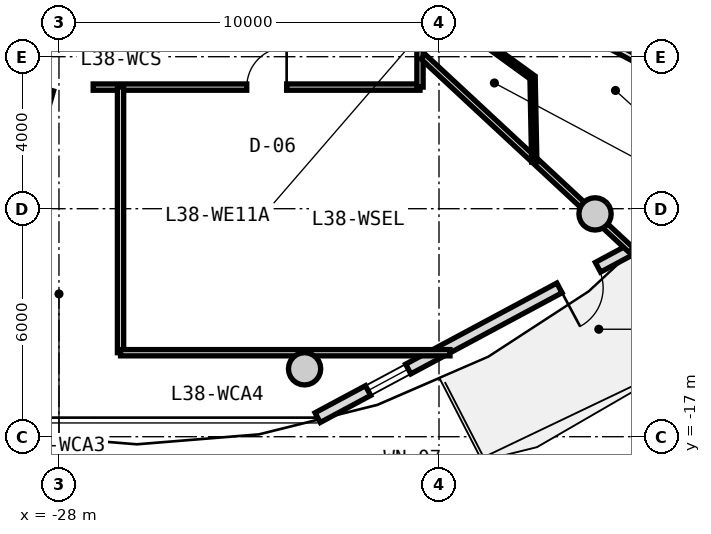
"""IFC4 building model, lengths in metres.
Left out: names, types, materials, properties, quantities, classifications, styles, units other than length and angle.
Written with IfcOpenShell. Run it as: python <this file> out.ifc"""

import sys

from ifc_helpers import new_model, si_unit, direction, frame, frame_2d, origin, origin_2d, place, context, subcontext, project, spatial, rectangle, circle, extrude, source, transform, mapped, element, fill, save


model = new_model("IFC4")
c1 = context("Model", 3, precision=1e-05, world=origin(), true_north=direction((0.0, 1.0)))
c2 = subcontext(c1, "Body", "Model", "MODEL_VIEW")
j1 = project(units=[si_unit("LENGTHUNIT", "METRE"), si_unit("PLANEANGLEUNIT", "RADIAN")], contexts=[c1])
p1 = place(None, origin())
s1 = spatial("IfcSite", under=j1, at=p1, CompositionType="ELEMENT")
p2 = place(p1, origin())
s2 = spatial("IfcBuilding", under=s1, at=p2, CompositionType="ELEMENT")
p3 = place(p2, frame((0.0, 0.0, 123.7)))
s3 = spatial("IfcBuildingStorey", under=s2, at=p3, CompositionType="ELEMENT", Elevation=123.7)
m1 = source(origin(), c2, "Body", "SweptSolid", [
    extrude(circle(Radius=0.425, at=origin_2d()), origin(), (0.0, 0.0, 1.0), 3.05),
])
for number, where, z_axis, x_axis in (
    (1, (-21.537, -15.213, 0.0), (0.0, 0.0, 1.0), (1.0, 0.0, 0.0)),
    (2, (-13.894, -11.137, 0.0), (0.0, 0.0, 1.0), (1.0, 0.0, 0.0)),
):
    element("IfcColumn", number, at=place(p3, frame(where, z_axis=z_axis, x_axis=x_axis)), inside=s3, PredefinedType="COLUMN", context=c2, shape_type="MappedRepresentation", body=[
        mapped(m1, transform((0.0, 0.0, 0.0), x_axis=(1.0, 0.0, 0.0), y_axis=(0.0, 1.0, 0.0), z_axis=(0.0, 0.0, 1.0), scale=1.0)),
    ])
m2 = source(origin(), c2, "Body", "SweptSolid", [
    extrude(rectangle(XDim=9.351, YDim=0.29, at=frame_2d((4.675, 0.0))), origin(), (0.0, 0.0, 1.0), 2.79),
])
p4 = place(p3, frame((-12.953, -12.077, 0.0), z_axis=(0.0, 0.0, 1.0), x_axis=(-0.881184411073, -0.472772708267, 0.0)))
e3 = element("IfcWall", 3, at=p4, inside=s3, PredefinedType="SOLIDWALL", context=c2, shape_type="MappedRepresentation", body=[
    mapped(m2, transform((0.0, 0.0, 0.0), x_axis=(1.0, 0.0, 0.0), y_axis=(0.0, 1.0, 0.0), z_axis=(0.0, 0.0, 1.0), scale=1.0)),
])
p5 = place(p4, frame((0.98, 0.0, 0.0)))
e4 = element("IfcOpeningElement", 4, at=p5, cuts=e3, PredefinedType="OPENING", context=c2, shape_type="SweptSolid", body=[
    extrude(rectangle(XDim=1.15, YDim=2.25, at=frame_2d((0.575, 1.125))), frame((0.0, 0.155, 0.0), z_axis=(0.0, -1.0, 0.0), x_axis=(1.0, 0.0, 0.0)), (0.0, 0.0, 1.0), 0.31),
])
p6 = place(p4, frame((6.645, 0.0, 0.85)))
e5 = element("IfcOpeningElement", 5, at=p6, cuts=e3, PredefinedType="OPENING", context=c2, shape_type="SweptSolid", body=[
    extrude(rectangle(XDim=1.2, YDim=1.5, at=frame_2d((0.6, 0.75))), frame((0.0, 0.155, 0.0), z_axis=(0.0, -1.0, 0.0), x_axis=(1.0, 0.0, 0.0)), (0.0, 0.0, 1.0), 0.31),
])
m3 = source(origin(), c2, "Body", "SweptSolid", [
    extrude(rectangle(XDim=8.6, YDim=0.165, at=frame_2d((4.3, 0.0))), origin(), (0.0, 0.0, 1.0), 2.775),
])
p7 = place(p3, frame((-18.5, -7.8, 0.0), z_axis=(0.0, 0.0, 1.0), x_axis=(-1.0, 0.0, 0.0)))
e6 = element("IfcWall", 6, at=p7, inside=s3, PredefinedType="PARTITIONING", context=c2, shape_type="MappedRepresentation", body=[
    mapped(m3, transform((0.0, 0.0, 0.0), x_axis=(1.0, 0.0, 0.0), y_axis=(0.0, 1.0, 0.0), z_axis=(0.0, 0.0, 1.0), scale=1.0)),
])
p8 = place(p7, frame((3.509, 0.0, 0.0)))
e7 = element("IfcOpeningElement", 7, at=p8, cuts=e6, PredefinedType="OPENING", context=c2, shape_type="SweptSolid", body=[
    extrude(rectangle(XDim=1.05, YDim=2.15, at=frame_2d((0.525, 1.075))), frame((0.0, 0.093, 0.0), z_axis=(0.0, -1.0, 0.0), x_axis=(1.0, 0.0, 0.0)), (0.0, 0.0, 1.0), 0.185),
])
m4 = source(origin(), c2, "Body", "SweptSolid", [
    extrude(rectangle(XDim=15.6, YDim=0.165, at=frame_2d((7.8, 0.0))), origin(), (0.0, 0.0, 1.0), 2.775),
])
p9 = place(p3, frame((-18.5, 7.8, 0.0), z_axis=(0.0, 0.0, 1.0), x_axis=(0.0, -1.0, 0.0)))
e8 = element("IfcWall", 8, at=p9, inside=s3, PredefinedType="PARTITIONING", context=c2, shape_type="MappedRepresentation", body=[
    mapped(m4, transform((0.0, 0.0, 0.0), x_axis=(1.0, 0.0, 0.0), y_axis=(0.0, 1.0, 0.0), z_axis=(0.0, 0.0, 1.0), scale=1.0)),
])
p10 = place(p9, frame((12.002, 0.0, 0.0)))
e9 = element("IfcOpeningElement", 9, at=p10, cuts=e8, PredefinedType="OPENING", context=c2, shape_type="SweptSolid", body=[
    extrude(rectangle(XDim=1.05, YDim=2.15, at=frame_2d((0.525, 1.075))), frame((0.0, 0.093, 0.0), z_axis=(0.0, -1.0, 0.0), x_axis=(1.0, 0.0, 0.0)), (0.0, 0.0, 1.0), 0.185),
])
p11 = place(p9, frame((10.211, 0.0, 0.0)))
e10 = element("IfcOpeningElement", 10, at=p11, cuts=e8, PredefinedType="OPENING", context=c2, shape_type="SweptSolid", body=[
    extrude(rectangle(XDim=1.05, YDim=2.15, at=frame_2d((0.525, 1.075))), frame((0.0, 0.093, 0.0), z_axis=(0.0, -1.0, 0.0), x_axis=(1.0, 0.0, 0.0)), (0.0, 0.0, 1.0), 0.185),
])
p12 = place(p9, frame((7.722, 0.0, 0.0)))
e11 = element("IfcOpeningElement", 11, at=p12, cuts=e8, PredefinedType="OPENING", context=c2, shape_type="SweptSolid", body=[
    extrude(rectangle(XDim=1.05, YDim=2.15, at=frame_2d((0.525, 1.075))), frame((0.0, 0.093, 0.0), z_axis=(0.0, -1.0, 0.0), x_axis=(1.0, 0.0, 0.0)), (0.0, 0.0, 1.0), 0.185),
])
p13 = place(p9, frame((6.291, 0.0, 0.0)))
e12 = element("IfcOpeningElement", 12, at=p13, cuts=e8, PredefinedType="OPENING", context=c2, shape_type="SweptSolid", body=[
    extrude(rectangle(XDim=1.05, YDim=2.15, at=frame_2d((0.525, 1.075))), frame((0.0, 0.093, 0.0), z_axis=(0.0, -1.0, 0.0), x_axis=(1.0, 0.0, 0.0)), (0.0, 0.0, 1.0), 0.185),
])
p14 = place(p9, frame((4.296, 0.0, 0.0)))
e13 = element("IfcOpeningElement", 13, at=p14, cuts=e8, PredefinedType="OPENING", context=c2, shape_type="SweptSolid", body=[
    extrude(rectangle(XDim=1.05, YDim=2.15, at=frame_2d((0.525, 1.075))), frame((0.0, 0.093, 0.0), z_axis=(0.0, -1.0, 0.0), x_axis=(1.0, 0.0, 0.0)), (0.0, 0.0, 1.0), 0.185),
])
p15 = place(p9, frame((1.654, 0.0, 0.0)))
e14 = element("IfcOpeningElement", 14, at=p15, cuts=e8, PredefinedType="OPENING", context=c2, shape_type="SweptSolid", body=[
    extrude(rectangle(XDim=1.05, YDim=2.15, at=frame_2d((0.525, 1.075))), frame((0.0, 0.093, 0.0), z_axis=(0.0, -1.0, 0.0), x_axis=(1.0, 0.0, 0.0)), (0.0, 0.0, 1.0), 0.185),
])
m5 = source(origin(), c2, "Body", "SweptSolid", [
    extrude(rectangle(XDim=8.989, YDim=0.165, at=frame_2d((4.495, 0.0))), origin(), (0.0, 0.0, 1.0), 2.275),
])
p16 = place(p3, frame((-28.222, -7.88, 0.0), z_axis=(0.0, 0.0, 1.0), x_axis=(-0.27702323008, -0.960863221274, 0.0)))
e15 = element("IfcWall", 15, at=p16, inside=s3, PredefinedType="PARTITIONING", context=c2, shape_type="MappedRepresentation", body=[
    mapped(m5, transform((0.0, 0.0, 0.0), x_axis=(1.0, 0.0, 0.0), y_axis=(0.0, 1.0, 0.0), z_axis=(0.0, 0.0, 1.0), scale=1.0)),
])
m6 = source(origin(), c2, "Body", "SweptSolid", [
    extrude(rectangle(XDim=7.482, YDim=0.165, at=frame_2d((3.741, 0.0))), origin(), (0.0, 0.0, 1.0), 2.275),
])
p17 = place(p3, frame((-18.42, -6.998, 0.0), z_axis=(0.0, 0.0, 1.0), x_axis=(0.732508698043, -0.680757671489, 0.0)))
e16 = element("IfcWall", 16, at=p17, inside=s3, PredefinedType="PARTITIONING", context=c2, shape_type="MappedRepresentation", body=[
    mapped(m6, transform((0.0, 0.0, 0.0), x_axis=(1.0, 0.0, 0.0), y_axis=(0.0, 1.0, 0.0), z_axis=(0.0, 0.0, 1.0), scale=1.0)),
])
m7 = source(origin(), c2, "Body", "SweptSolid", [
    extrude(rectangle(XDim=6.99, YDim=0.165, at=frame_2d((3.495, 0.0))), origin(), (0.0, 0.0, 1.0), 2.775),
])
p18 = place(p3, frame((-26.38, -14.79, 0.0), z_axis=(0.0, 0.0, 1.0), x_axis=(0.0, 1.0, 0.0)))
e17 = element("IfcWall", 17, at=p18, inside=s3, PredefinedType="PARTITIONING", context=c2, shape_type="MappedRepresentation", body=[
    mapped(m7, transform((0.0, 0.0, 0.0), x_axis=(1.0, 0.0, 0.0), y_axis=(0.0, 1.0, 0.0), z_axis=(0.0, 0.0, 1.0), scale=1.0)),
])
m8 = source(origin(), c2, "Body", "SweptSolid", [
    extrude(rectangle(XDim=8.669, YDim=0.165, at=frame_2d((4.335, 0.0))), origin(), (0.0, 0.0, 1.0), 2.775),
])
p19 = place(p3, frame((-26.38, -14.79, 0.0), z_axis=(0.0, 0.0, 1.0), x_axis=(1.0, 0.0, 0.0)))
e18 = element("IfcWall", 18, at=p19, inside=s3, PredefinedType="PARTITIONING", context=c2, shape_type="MappedRepresentation", body=[
    mapped(m8, transform((0.0, 0.0, 0.0), x_axis=(1.0, 0.0, 0.0), y_axis=(0.0, 1.0, 0.0), z_axis=(0.0, 0.0, 1.0), scale=1.0)),
])
m9 = source(origin(), c2, "Body", "SweptSolid", [
    extrude(rectangle(XDim=8.744, YDim=0.19, at=frame_2d((4.372, 0.0))), origin(), (0.0, 0.0, 1.0), 2.775),
])
p20 = place(p3, frame((-18.273, -4.142, 0.0), z_axis=(0.0, 0.0, 1.0), x_axis=(0.882252449936, -0.470776607938, 0.0)))
e19 = element("IfcWall", 19, at=p20, inside=s3, PredefinedType="PARTITIONING", context=c2, shape_type="MappedRepresentation", body=[
    mapped(m9, transform((0.0, 0.0, 0.0), x_axis=(1.0, 0.0, 0.0), y_axis=(0.0, 1.0, 0.0), z_axis=(0.0, 0.0, 1.0), scale=1.0)),
])
m10 = source(origin(), c2, "Body", "SweptSolid", [
    extrude(rectangle(XDim=3.621, YDim=0.14, at=frame_2d((1.811, 0.0))), origin(), (0.0, 0.0, 1.0), 2.775),
])
p21 = place(p3, frame((-18.47, -5.422, 0.0), z_axis=(0.0, 0.0, 1.0), x_axis=(0.80968252222, -0.586868139544, 0.0)))
e20 = element("IfcWall", 20, at=p21, inside=s3, PredefinedType="PARTITIONING", context=c2, shape_type="MappedRepresentation", body=[
    mapped(m10, transform((0.0, 0.0, 0.0), x_axis=(1.0, 0.0, 0.0), y_axis=(0.0, 1.0, 0.0), z_axis=(0.0, 0.0, 1.0), scale=1.0)),
])
p22 = place(p21, frame((1.351, 0.0, 0.0)))
e21 = element("IfcOpeningElement", 21, at=p22, cuts=e20, PredefinedType="OPENING", context=c2, shape_type="SweptSolid", body=[
    extrude(rectangle(XDim=0.92, YDim=2.1, at=frame_2d((0.46, 1.05))), frame((0.0, 0.08, 0.0), z_axis=(0.0, -1.0, 0.0), x_axis=(1.0, 0.0, 0.0)), (0.0, 0.0, 1.0), 0.16),
])
m11 = source(origin(), c2, "Body", "SweptSolid", [
    extrude(rectangle(XDim=2.225, YDim=0.14, at=frame_2d((1.112, 0.0))), origin(), (0.0, 0.0, 1.0), 2.775),
])
p23 = place(p3, frame((-15.538, -7.547, 0.0), z_axis=(0.0, 0.0, 1.0), x_axis=(0.019971869027, -0.999800542332, 0.0)))
e22 = element("IfcWall", 22, at=p23, inside=s3, PredefinedType="PARTITIONING", context=c2, shape_type="MappedRepresentation", body=[
    mapped(m11, transform((0.0, 0.0, 0.0), x_axis=(1.0, 0.0, 0.0), y_axis=(0.0, 1.0, 0.0), z_axis=(0.0, 0.0, 1.0), scale=1.0)),
])
m12 = source(origin(), c2, "Body", "SweptSolid", [
    extrude(rectangle(XDim=1.15, YDim=2.25, at=frame_2d((0.575, 1.125))), frame((0.0, 0.025, 0.0), z_axis=(0.0, -1.0, 0.0), x_axis=(1.0, 0.0, 0.0)), (0.0, 0.0, 1.0), 0.05),
])
p24 = place(p5, origin())
e23 = element("IfcDoor", 23, at=p24, inside=s3, OperationType="SINGLE_SWING_RIGHT", PredefinedType="DOOR", context=c2, shape_type="MappedRepresentation", body=[
    mapped(m12, transform((0.0, 0.0, 0.0), x_axis=(1.0, 0.0, 0.0), y_axis=(0.0, 1.0, 0.0), z_axis=(0.0, 0.0, 1.0), scale=1.0)),
])
fill(e4, e23)
m13 = source(origin(), c2, "Body", "SweptSolid", [
    extrude(rectangle(XDim=1.2, YDim=1.5, at=frame_2d((0.6, 0.75))), frame((0.0, 0.03, 0.0), z_axis=(0.0, -1.0, 0.0), x_axis=(1.0, 0.0, 0.0)), (0.0, 0.0, 1.0), 0.06),
])
p25 = place(p6, origin())
e24 = element("IfcWindow", 24, at=p25, inside=s3, PartitioningType="SINGLE_PANEL", PredefinedType="WINDOW", context=c2, shape_type="MappedRepresentation", body=[
    mapped(m13, transform((0.0, 0.0, 0.0), x_axis=(1.0, 0.0, 0.0), y_axis=(0.0, 1.0, 0.0), z_axis=(0.0, 0.0, 1.0), scale=1.0)),
])
fill(e5, e24)
m14 = source(origin(), c2, "Body", "SweptSolid", [
    extrude(rectangle(XDim=1.05, YDim=2.15, at=frame_2d((0.525, 1.075))), frame((0.0, 0.025, 0.0), z_axis=(0.0, -1.0, 0.0), x_axis=(1.0, 0.0, 0.0)), (0.0, 0.0, 1.0), 0.05),
])
p26 = place(p8, frame((1.05, 0.0, 0.0), z_axis=(0.0, 0.0, 1.0), x_axis=(-1.0, 0.0, 0.0)))
e25 = element("IfcDoor", 25, at=p26, inside=s3, OperationType="SINGLE_SWING_RIGHT", PredefinedType="DOOR", context=c2, shape_type="MappedRepresentation", body=[
    mapped(m14, transform((0.0, 0.0, 0.0), x_axis=(1.0, 0.0, 0.0), y_axis=(0.0, 1.0, 0.0), z_axis=(0.0, 0.0, 1.0), scale=1.0)),
])
fill(e7, e25)
save(model, sys.argv[1])
